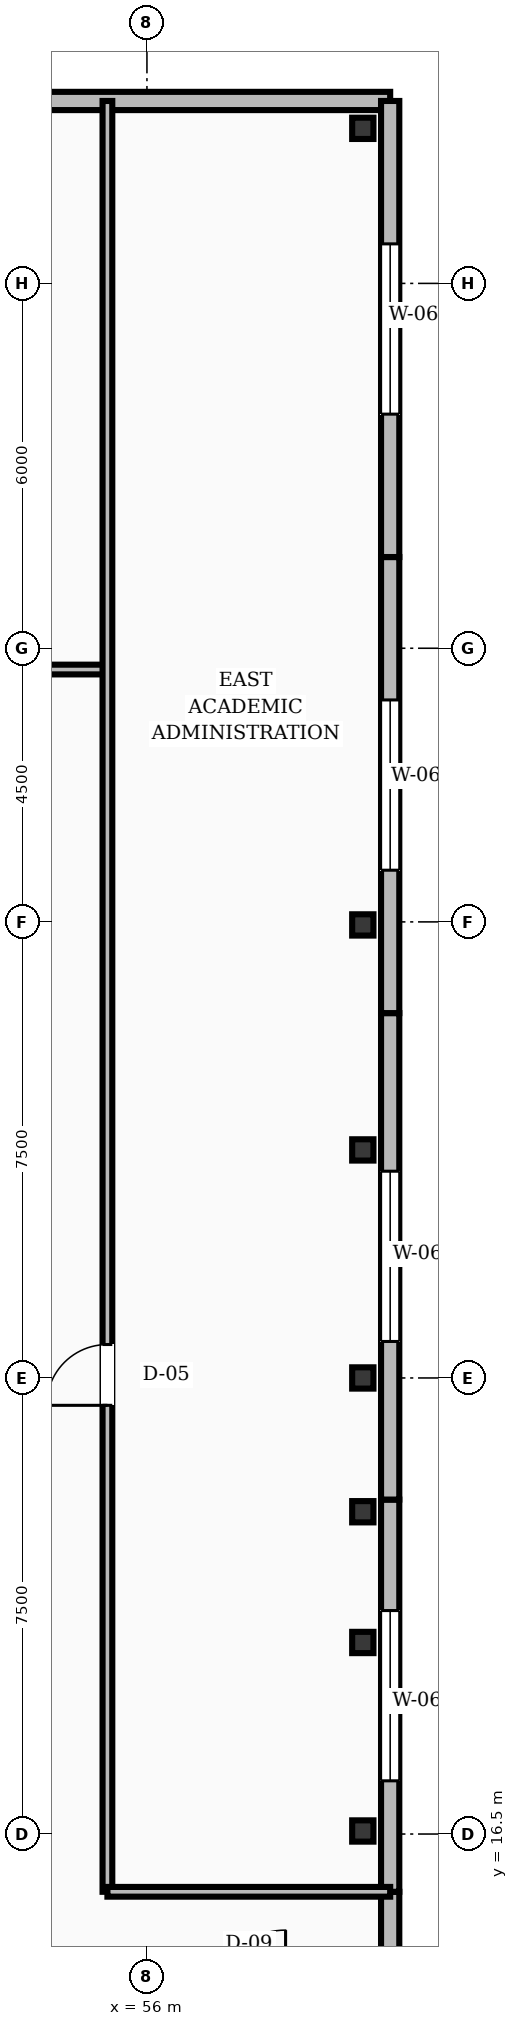
"""IFC4 building model, lengths in metres.
Left out: names, types, materials, properties, quantities, classifications, styles, units other than length and angle.
Written with IfcOpenShell. Run it as: python <this file> out.ifc"""

import sys

from ifc_helpers import new_model, si_unit, direction, frame, frame_2d, origin, origin_2d, place, context, subcontext, project, spatial, rectangle, hollow_rectangle, i_section, extrude, element, fill, save


model = new_model("IFC4")
c1 = context("Model", 3, precision=1e-05, world=origin(), true_north=direction((0.0, 1.0)))
c2 = subcontext(c1, "Body", "Model", "MODEL_VIEW")
j1 = project(units=[si_unit("LENGTHUNIT", "METRE"), si_unit("PLANEANGLEUNIT", "RADIAN")], contexts=[c1])
p1 = place(None, origin())
s1 = spatial("IfcSite", under=j1, at=p1, CompositionType="ELEMENT")
p2 = place(p1, origin())
s2 = spatial("IfcBuilding", under=s1, at=p2, CompositionType="ELEMENT")
p3 = place(p2, frame((0.0, 0.0, 19.6)))
s3 = spatial("IfcBuildingStorey", under=s2, at=p3, CompositionType="ELEMENT", Elevation=19.6)
for number, where, z_axis, x_axis in (
    (1, (59.55, 44.55, 0.0), (0.0, 0.0, 1.0), (1.0, 0.0, 0.0)),
    (2, (59.55, 16.55, 0.0), (0.0, 0.0, 1.0), (1.0, 0.0, 0.0)),
    (3, (59.55, 19.65, 0.0), (0.0, 0.0, 1.0), (1.0, 0.0, 0.0)),
    (4, (59.55, 24.0, 0.0), (0.0, 0.0, 1.0), (1.0, 0.0, 0.0)),
    (5, (59.55, 27.75, 0.0), (0.0, 0.0, 1.0), (1.0, 0.0, 0.0)),
    (6, (59.55, 31.45, 0.0), (0.0, 0.0, 1.0), (1.0, 0.0, 0.0)),
):
    element("IfcColumn", number, at=place(p3, frame(where, z_axis=z_axis, x_axis=x_axis)), inside=s3, PredefinedType="COLUMN", context=c2, shape_type="SweptSolid", body=[
        extrude(i_section(OverallWidth=0.35, OverallDepth=0.35, WebThickness=0.012, FlangeThickness=0.019, FilletRadius=0.016, at=origin_2d()), origin(), (0.0, 0.0, 1.0), 4.8),
    ])
p4 = place(p3, frame((59.55, 21.8, 0.0), z_axis=(0.0, 0.0, 1.0), x_axis=(1.0, 0.0, 0.0)))
e7 = element("IfcColumn", 7, at=p4, inside=s3, PredefinedType="PILASTER", context=c2, shape_type="SweptSolid", body=[
    extrude(hollow_rectangle(XDim=0.35, YDim=0.35, WallThickness=0.016, at=origin_2d()), origin(), (0.0, 0.0, 1.0), 4.8),
])
p5 = place(p3, frame((60.0, 45.0, 0.0), z_axis=(0.0, 0.0, 1.0), x_axis=(-1.0, 0.0, 0.0)))
e8 = element("IfcWall", 8, at=p5, inside=s3, PredefinedType="STANDARD", context=c2, shape_type="SweptSolid", body=[
    extrude(rectangle(XDim=8.0, YDim=0.3, at=frame_2d((4.0, 0.0))), origin(), (0.0, 0.0, 1.0), 3.47),
])
p6 = place(p3, frame((60.0, 13.72, 0.0), z_axis=(0.0, 0.0, 1.0), x_axis=(0.0, 1.0, 0.0)))
e9 = element("IfcWall", 9, at=p6, inside=s3, PredefinedType="STANDARD", context=c2, shape_type="SweptSolid", body=[
    extrude(rectangle(XDim=1.83, YDim=0.3, at=frame_2d((0.915, 0.0))), origin(), (0.0, 0.0, 1.0), 3.47),
])
p7 = place(p3, frame((60.0, 15.55, 0.0), z_axis=(0.0, 0.0, 1.0), x_axis=(0.0, 1.0, 0.0)))
e10 = element("IfcWall", 10, at=p7, inside=s3, PredefinedType="STANDARD", context=c2, shape_type="SweptSolid", body=[
    extrude(rectangle(XDim=6.45, YDim=0.3, at=frame_2d((3.225, 0.0))), origin(), (0.0, 0.0, 1.0), 3.47),
])
p8 = place(p7, frame((1.825, 0.0, 0.85)))
e11 = element("IfcOpeningElement", 11, at=p8, cuts=e10, PredefinedType="OPENING", context=c2, shape_type="SweptSolid", body=[
    extrude(rectangle(XDim=2.8, YDim=2.3, at=frame_2d((1.4, 1.15))), frame((0.0, 0.16, 0.0), z_axis=(0.0, -1.0, 0.0), x_axis=(1.0, 0.0, 0.0)), (0.0, 0.0, 1.0), 0.32),
])
p9 = place(p3, frame((60.0, 22.0, 0.0), z_axis=(0.0, 0.0, 1.0), x_axis=(0.0, 1.0, 0.0)))
e12 = element("IfcWall", 12, at=p9, inside=s3, PredefinedType="STANDARD", context=c2, shape_type="SweptSolid", body=[
    extrude(rectangle(XDim=8.0, YDim=0.3, at=frame_2d((4.0, 0.0))), origin(), (0.0, 0.0, 1.0), 3.47),
])
p10 = place(p9, frame((2.6, 0.0, 0.85)))
e13 = element("IfcOpeningElement", 13, at=p10, cuts=e12, PredefinedType="OPENING", context=c2, shape_type="SweptSolid", body=[
    extrude(rectangle(XDim=2.8, YDim=2.3, at=frame_2d((1.4, 1.15))), frame((0.0, 0.16, 0.0), z_axis=(0.0, -1.0, 0.0), x_axis=(1.0, 0.0, 0.0)), (0.0, 0.0, 1.0), 0.32),
])
p11 = place(p3, frame((60.0, 30.0, 0.0), z_axis=(0.0, 0.0, 1.0), x_axis=(0.0, 1.0, 0.0)))
e14 = element("IfcWall", 14, at=p11, inside=s3, PredefinedType="STANDARD", context=c2, shape_type="SweptSolid", body=[
    extrude(rectangle(XDim=7.5, YDim=0.3, at=frame_2d((3.75, 0.0))), origin(), (0.0, 0.0, 1.0), 3.47),
])
p12 = place(p11, frame((2.35, 0.0, 0.85)))
e15 = element("IfcOpeningElement", 15, at=p12, cuts=e14, PredefinedType="OPENING", context=c2, shape_type="SweptSolid", body=[
    extrude(rectangle(XDim=2.8, YDim=2.3, at=frame_2d((1.4, 1.15))), frame((0.0, 0.16, 0.0), z_axis=(0.0, -1.0, 0.0), x_axis=(1.0, 0.0, 0.0)), (0.0, 0.0, 1.0), 0.32),
])
p13 = place(p3, frame((60.0, 37.5, 0.0), z_axis=(0.0, 0.0, 1.0), x_axis=(0.0, 1.0, 0.0)))
e16 = element("IfcWall", 16, at=p13, inside=s3, PredefinedType="STANDARD", context=c2, shape_type="SweptSolid", body=[
    extrude(rectangle(XDim=7.5, YDim=0.3, at=frame_2d((3.75, 0.0))), origin(), (0.0, 0.0, 1.0), 3.47),
])
p14 = place(p13, frame((2.35, 0.0, 0.85)))
e17 = element("IfcOpeningElement", 17, at=p14, cuts=e16, PredefinedType="OPENING", context=c2, shape_type="SweptSolid", body=[
    extrude(rectangle(XDim=2.8, YDim=2.3, at=frame_2d((1.4, 1.15))), frame((0.0, 0.16, 0.0), z_axis=(0.0, -1.0, 0.0), x_axis=(1.0, 0.0, 0.0)), (0.0, 0.0, 1.0), 0.32),
])
p15 = place(p3, frame((8.65, 35.65, 0.0), z_axis=(0.0, 0.0, 1.0), x_axis=(1.0, 0.0, 0.0)))
e18 = element("IfcWall", 18, at=p15, inside=s3, PredefinedType="SOLIDWALL", context=c2, shape_type="SweptSolid", body=[
    extrude(rectangle(XDim=46.7, YDim=0.16, at=frame_2d((23.35, 0.0))), origin(), (0.0, 0.0, 1.0), 3.42),
])
p16 = place(p15, frame((6.0, 0.0, 0.0)))
e19 = element("IfcOpeningElement", 19, at=p16, cuts=e18, PredefinedType="OPENING", context=c2, shape_type="SweptSolid", body=[
    extrude(rectangle(XDim=1.2, YDim=2.1, at=frame_2d((0.6, 1.05))), frame((0.0, 0.09, 0.0), z_axis=(0.0, -1.0, 0.0), x_axis=(1.0, 0.0, 0.0)), (0.0, 0.0, 1.0), 0.18),
])
p17 = place(p15, frame((20.0, 0.0, 0.0)))
e20 = element("IfcOpeningElement", 20, at=p17, cuts=e18, PredefinedType="OPENING", context=c2, shape_type="SweptSolid", body=[
    extrude(rectangle(XDim=1.0, YDim=2.1, at=frame_2d((0.5, 1.05))), frame((0.0, 0.09, 0.0), z_axis=(0.0, -1.0, 0.0), x_axis=(1.0, 0.0, 0.0)), (0.0, 0.0, 1.0), 0.18),
])
p18 = place(p15, frame((41.5, 0.0, 0.0)))
e21 = element("IfcOpeningElement", 21, at=p18, cuts=e18, PredefinedType="OPENING", context=c2, shape_type="SweptSolid", body=[
    extrude(rectangle(XDim=0.95, YDim=2.1, at=frame_2d((0.475, 1.05))), frame((0.0, 0.09, 0.0), z_axis=(0.0, -1.0, 0.0), x_axis=(1.0, 0.0, 0.0)), (0.0, 0.0, 1.0), 0.18),
])
p19 = place(p3, frame((55.35, 15.55, 0.0), z_axis=(0.0, 0.0, 1.0), x_axis=(0.0, 1.0, 0.0)))
e22 = element("IfcWall", 22, at=p19, inside=s3, PredefinedType="SOLIDWALL", context=c2, shape_type="SweptSolid", body=[
    extrude(rectangle(XDim=29.45, YDim=0.16, at=frame_2d((14.725, 0.0))), origin(), (0.0, 0.0, 1.0), 3.42),
])
p20 = place(p19, frame((8.0, 0.0, 0.0)))
e23 = element("IfcOpeningElement", 23, at=p20, cuts=e22, PredefinedType="OPENING", context=c2, shape_type="SweptSolid", body=[
    extrude(rectangle(XDim=1.0, YDim=2.1, at=frame_2d((0.5, 1.05))), frame((0.0, 0.09, 0.0), z_axis=(0.0, -1.0, 0.0), x_axis=(1.0, 0.0, 0.0)), (0.0, 0.0, 1.0), 0.18),
])
p21 = place(p3, frame((55.35, 15.55, 0.0), z_axis=(0.0, 0.0, 1.0), x_axis=(1.0, 0.0, 0.0)))
e24 = element("IfcWall", 24, at=p21, inside=s3, PredefinedType="SOLIDWALL", context=c2, shape_type="SweptSolid", body=[
    extrude(rectangle(XDim=4.65, YDim=0.16, at=frame_2d((2.325, 0.0))), origin(), (0.0, 0.0, 1.0), 3.42),
])
p22 = place(p8, origin())
e25 = element("IfcWindow", 25, at=p22, inside=s3, PartitioningType="SINGLE_PANEL", PredefinedType="WINDOW", context=c2, shape_type="SweptSolid", body=[
    extrude(rectangle(XDim=2.8, YDim=2.3, at=frame_2d((1.4, 1.15))), frame((0.0, 0.03, 0.0), z_axis=(0.0, -1.0, 0.0), x_axis=(1.0, 0.0, 0.0)), (0.0, 0.0, 1.0), 0.06),
])
fill(e11, e25)
p23 = place(p10, origin())
e26 = element("IfcWindow", 26, at=p23, inside=s3, PartitioningType="SINGLE_PANEL", PredefinedType="WINDOW", context=c2, shape_type="SweptSolid", body=[
    extrude(rectangle(XDim=2.8, YDim=2.3, at=frame_2d((1.4, 1.15))), frame((0.0, 0.03, 0.0), z_axis=(0.0, -1.0, 0.0), x_axis=(1.0, 0.0, 0.0)), (0.0, 0.0, 1.0), 0.06),
])
fill(e13, e26)
p24 = place(p12, origin())
e27 = element("IfcWindow", 27, at=p24, inside=s3, PartitioningType="SINGLE_PANEL", PredefinedType="WINDOW", context=c2, shape_type="SweptSolid", body=[
    extrude(rectangle(XDim=2.8, YDim=2.3, at=frame_2d((1.4, 1.15))), frame((0.0, 0.03, 0.0), z_axis=(0.0, -1.0, 0.0), x_axis=(1.0, 0.0, 0.0)), (0.0, 0.0, 1.0), 0.06),
])
fill(e15, e27)
p25 = place(p14, origin())
e28 = element("IfcWindow", 28, at=p25, inside=s3, PartitioningType="SINGLE_PANEL", PredefinedType="WINDOW", context=c2, shape_type="SweptSolid", body=[
    extrude(rectangle(XDim=2.8, YDim=2.3, at=frame_2d((1.4, 1.15))), frame((0.0, 0.03, 0.0), z_axis=(0.0, -1.0, 0.0), x_axis=(1.0, 0.0, 0.0)), (0.0, 0.0, 1.0), 0.06),
])
fill(e17, e28)
p26 = place(p20, origin())
e29 = element("IfcDoor", 29, at=p26, inside=s3, OperationType="SINGLE_SWING_LEFT", PredefinedType="DOOR", context=c2, shape_type="SweptSolid", body=[
    extrude(rectangle(XDim=1.0, YDim=2.1, at=frame_2d((0.5, 1.05))), frame((0.0, 0.025, 0.0), z_axis=(0.0, -1.0, 0.0), x_axis=(1.0, 0.0, 0.0)), (0.0, 0.0, 1.0), 0.05),
])
fill(e23, e29)
save(model, sys.argv[1])
